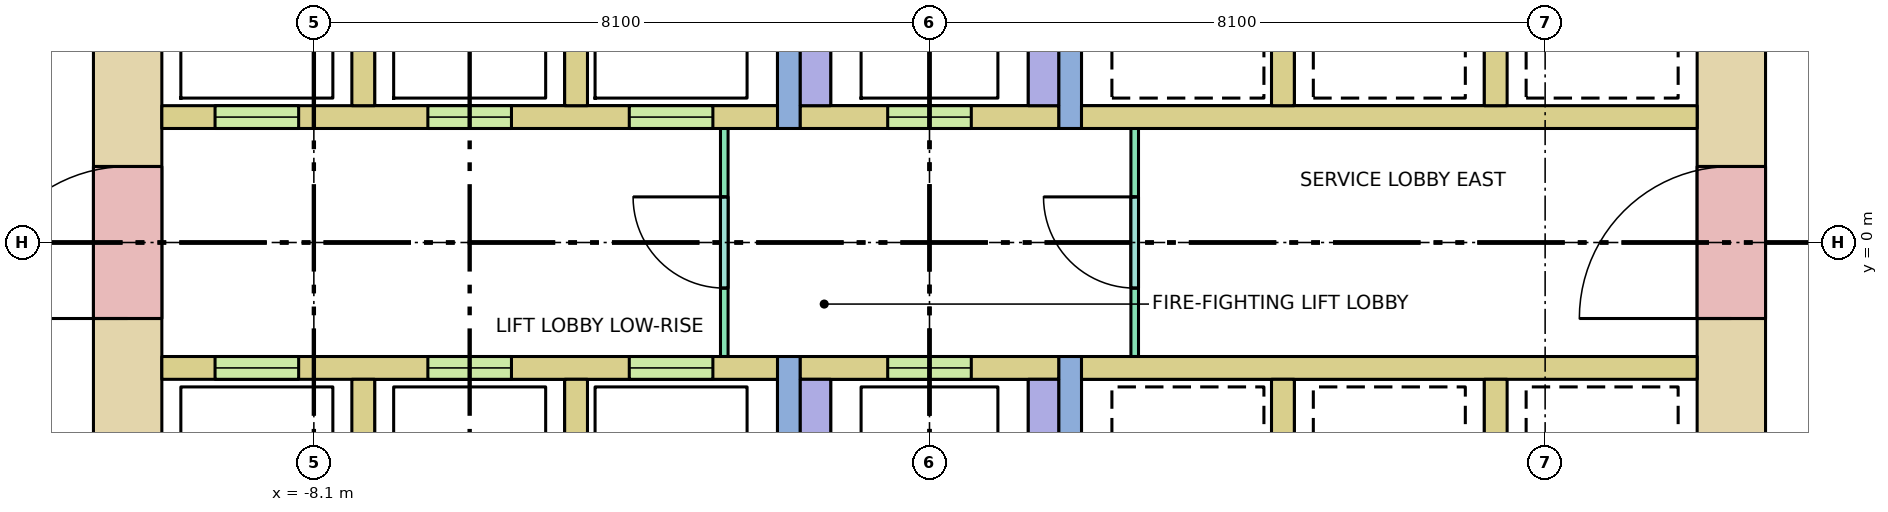
"""IFC4 building model, lengths in metres.
Left out: names, types, materials, properties, quantities, classifications, styles, units other than length and angle.
Written with IfcOpenShell. Run it as: python <this file> out.ifc"""

import sys

from ifc_helpers import new_model, si_unit, direction, frame, frame_2d, origin, place, context, subcontext, project, spatial, rectangle, extrude, element, fill, save


model = new_model("IFC4")
c1 = context("Model", 3, precision=1e-05, world=origin(), true_north=direction((0.0, 1.0)))
c2 = subcontext(c1, "Body", "Model", "MODEL_VIEW")
j1 = project(units=[si_unit("LENGTHUNIT", "METRE"), si_unit("PLANEANGLEUNIT", "RADIAN")], contexts=[c1])
p1 = place(None, origin())
s1 = spatial("IfcSite", under=j1, at=p1, CompositionType="ELEMENT")
p2 = place(p1, origin())
s2 = spatial("IfcBuilding", under=s1, at=p2, CompositionType="ELEMENT")
p3 = place(p2, frame((0.0, 0.0, 127.6)))
s3 = spatial("IfcBuildingStorey", under=s2, at=p3, CompositionType="ELEMENT", Elevation=127.6)
p4 = place(p3, frame((-10.55, -5.13, -0.28), z_axis=(0.0, 0.0, 1.0), x_axis=(0.0, 1.0, 0.0)))
e1 = element("IfcWall", 1, at=p4, inside=s3, PredefinedType="SHEAR", context=c2, shape_type="SweptSolid", body=[
    extrude(rectangle(XDim=10.26, YDim=0.9, at=frame_2d((5.13, 0.0))), origin(), (0.0, 0.0, 1.0), 3.8),
])
p5 = place(p4, frame((4.13, 0.0, 0.28)))
e2 = element("IfcOpeningElement", 2, at=p5, cuts=e1, PredefinedType="OPENING", context=c2, shape_type="SweptSolid", body=[
    extrude(rectangle(XDim=2.0, YDim=2.1, at=frame_2d((1.0, 1.05))), frame((0.0, 0.46, 0.0), z_axis=(0.0, -1.0, 0.0), x_axis=(1.0, 0.0, 0.0)), (0.0, 0.0, 1.0), 0.92),
])
p6 = place(p3, frame((10.55, -5.13, -0.28), z_axis=(0.0, 0.0, 1.0), x_axis=(0.0, 1.0, 0.0)))
e3 = element("IfcWall", 3, at=p6, inside=s3, PredefinedType="SHEAR", context=c2, shape_type="SweptSolid", body=[
    extrude(rectangle(XDim=10.26, YDim=0.9, at=frame_2d((5.13, 0.0))), origin(), (0.0, 0.0, 1.0), 3.8),
])
p7 = place(p6, frame((4.13, 0.0, 0.28)))
e4 = element("IfcOpeningElement", 4, at=p7, cuts=e3, PredefinedType="OPENING", context=c2, shape_type="SweptSolid", body=[
    extrude(rectangle(XDim=2.0, YDim=2.1, at=frame_2d((1.0, 1.05))), frame((0.0, 0.46, 0.0), z_axis=(0.0, -1.0, 0.0), x_axis=(1.0, 0.0, 0.0)), (0.0, 0.0, 1.0), 0.92),
])
p8 = place(p3, frame((-10.1, 1.65, 0.0), z_axis=(0.0, 0.0, 1.0), x_axis=(1.0, 0.0, 0.0)))
e5 = element("IfcWall", 5, at=p8, inside=s3, PredefinedType="SOLIDWALL", context=c2, shape_type="SweptSolid", body=[
    extrude(rectangle(XDim=8.1, YDim=0.3, at=frame_2d((4.05, 0.0))), origin(), (0.0, 0.0, 1.0), 3.52),
])
p9 = place(p8, frame((0.7, 0.0, 0.0)))
e6 = element("IfcOpeningElement", 6, at=p9, cuts=e5, PredefinedType="OPENING", context=c2, shape_type="SweptSolid", body=[
    extrude(rectangle(XDim=1.1, YDim=2.1, at=frame_2d((0.55, 1.05))), frame((0.0, 0.16, 0.0), z_axis=(0.0, -1.0, 0.0), x_axis=(1.0, 0.0, 0.0)), (0.0, 0.0, 1.0), 0.32),
])
p10 = place(p8, frame((3.5, 0.0, 0.0)))
e7 = element("IfcOpeningElement", 7, at=p10, cuts=e5, PredefinedType="OPENING", context=c2, shape_type="SweptSolid", body=[
    extrude(rectangle(XDim=1.1, YDim=2.1, at=frame_2d((0.55, 1.05))), frame((0.0, 0.16, 0.0), z_axis=(0.0, -1.0, 0.0), x_axis=(1.0, 0.0, 0.0)), (0.0, 0.0, 1.0), 0.32),
])
p11 = place(p8, frame((6.15, 0.0, 0.0)))
e8 = element("IfcOpeningElement", 8, at=p11, cuts=e5, PredefinedType="OPENING", context=c2, shape_type="SweptSolid", body=[
    extrude(rectangle(XDim=1.1, YDim=2.1, at=frame_2d((0.55, 1.05))), frame((0.0, 0.16, 0.0), z_axis=(0.0, -1.0, 0.0), x_axis=(1.0, 0.0, 0.0)), (0.0, 0.0, 1.0), 0.32),
])
p12 = place(p3, frame((-10.1, -1.65, 0.0), z_axis=(0.0, 0.0, 1.0), x_axis=(1.0, 0.0, 0.0)))
e9 = element("IfcWall", 9, at=p12, inside=s3, PredefinedType="SOLIDWALL", context=c2, shape_type="SweptSolid", body=[
    extrude(rectangle(XDim=8.1, YDim=0.3, at=frame_2d((4.05, 0.0))), origin(), (0.0, 0.0, 1.0), 3.52),
])
p13 = place(p12, frame((0.7, 0.0, 0.0)))
e10 = element("IfcOpeningElement", 10, at=p13, cuts=e9, PredefinedType="OPENING", context=c2, shape_type="SweptSolid", body=[
    extrude(rectangle(XDim=1.1, YDim=2.1, at=frame_2d((0.55, 1.05))), frame((0.0, 0.16, 0.0), z_axis=(0.0, -1.0, 0.0), x_axis=(1.0, 0.0, 0.0)), (0.0, 0.0, 1.0), 0.32),
])
p14 = place(p12, frame((3.5, 0.0, 0.0)))
e11 = element("IfcOpeningElement", 11, at=p14, cuts=e9, PredefinedType="OPENING", context=c2, shape_type="SweptSolid", body=[
    extrude(rectangle(XDim=1.1, YDim=2.1, at=frame_2d((0.55, 1.05))), frame((0.0, 0.16, 0.0), z_axis=(0.0, -1.0, 0.0), x_axis=(1.0, 0.0, 0.0)), (0.0, 0.0, 1.0), 0.32),
])
p15 = place(p12, frame((6.15, 0.0, 0.0)))
e12 = element("IfcOpeningElement", 12, at=p15, cuts=e9, PredefinedType="OPENING", context=c2, shape_type="SweptSolid", body=[
    extrude(rectangle(XDim=1.1, YDim=2.1, at=frame_2d((0.55, 1.05))), frame((0.0, 0.16, 0.0), z_axis=(0.0, -1.0, 0.0), x_axis=(1.0, 0.0, 0.0)), (0.0, 0.0, 1.0), 0.32),
])
for number, where, z_axis, x_axis in (
    (13, (2.0, 1.65, 0.0), (0.0, 0.0, 1.0), (1.0, 0.0, 0.0)),
    (14, (2.0, -1.65, 0.0), (0.0, 0.0, 1.0), (1.0, 0.0, 0.0)),
):
    element("IfcWall", number, at=place(p3, frame(where, z_axis=z_axis, x_axis=x_axis)), inside=s3, PredefinedType="SOLIDWALL", context=c2, shape_type="SweptSolid", body=[
        extrude(rectangle(XDim=8.1, YDim=0.3, at=frame_2d((4.05, 0.0))), origin(), (0.0, 0.0, 1.0), 3.52),
    ])
for number, where, z_axis, x_axis in (
    (15, (-7.45, 1.8, 0.0), (0.0, 0.0, 1.0), (0.0, 1.0, 0.0)),
    (16, (-7.45, -4.2, 0.0), (0.0, 0.0, 1.0), (0.0, 1.0, 0.0)),
    (17, (-4.65, 1.8, 0.0), (0.0, 0.0, 1.0), (0.0, 1.0, 0.0)),
    (18, (-4.65, -4.2, 0.0), (0.0, 0.0, 1.0), (0.0, 1.0, 0.0)),
    (19, (4.65, 1.8, 0.0), (0.0, 0.0, 1.0), (0.0, 1.0, 0.0)),
    (20, (4.65, -4.2, 0.0), (0.0, 0.0, 1.0), (0.0, 1.0, 0.0)),
    (21, (7.45, 1.8, 0.0), (0.0, 0.0, 1.0), (0.0, 1.0, 0.0)),
    (22, (7.45, -4.2, 0.0), (0.0, 0.0, 1.0), (0.0, 1.0, 0.0)),
):
    element("IfcWall", number, at=place(p3, frame(where, z_axis=z_axis, x_axis=x_axis)), inside=s3, PredefinedType="SOLIDWALL", context=c2, shape_type="SweptSolid", body=[
        extrude(rectangle(XDim=2.4, YDim=0.3, at=frame_2d((1.2, 0.0))), origin(), (0.0, 0.0, 1.0), 3.52),
    ])
for number, where, z_axis, x_axis in (
    (23, (-1.85, 1.5, 0.0), (0.0, 0.0, 1.0), (0.0, 1.0, 0.0)),
    (24, (-1.85, -8.1, 0.0), (0.0, 0.0, 1.0), (0.0, 1.0, 0.0)),
    (25, (1.85, 1.5, 0.0), (0.0, 0.0, 1.0), (0.0, 1.0, 0.0)),
    (26, (1.85, -8.1, 0.0), (0.0, 0.0, 1.0), (0.0, 1.0, 0.0)),
):
    element("IfcWall", number, at=place(p3, frame(where, z_axis=z_axis, x_axis=x_axis)), inside=s3, PredefinedType="SHEAR", context=c2, shape_type="SweptSolid", body=[
        extrude(rectangle(XDim=6.6, YDim=0.3, at=frame_2d((3.3, 0.0))), origin(), (0.0, 0.0, 1.0), 3.52),
    ])
p16 = place(p3, frame((-1.7, 1.65, 0.0), z_axis=(0.0, 0.0, 1.0), x_axis=(1.0, 0.0, 0.0)))
e27 = element("IfcWall", 27, at=p16, inside=s3, PredefinedType="SOLIDWALL", context=c2, shape_type="SweptSolid", body=[
    extrude(rectangle(XDim=3.4, YDim=0.3, at=frame_2d((1.7, 0.0))), origin(), (0.0, 0.0, 1.0), 3.52),
])
p17 = place(p16, frame((1.15, 0.0, 0.0)))
e28 = element("IfcOpeningElement", 28, at=p17, cuts=e27, PredefinedType="OPENING", context=c2, shape_type="SweptSolid", body=[
    extrude(rectangle(XDim=1.1, YDim=2.1, at=frame_2d((0.55, 1.05))), frame((0.0, 0.16, 0.0), z_axis=(0.0, -1.0, 0.0), x_axis=(1.0, 0.0, 0.0)), (0.0, 0.0, 1.0), 0.32),
])
p18 = place(p3, frame((-1.7, -1.65, 0.0), z_axis=(0.0, 0.0, 1.0), x_axis=(1.0, 0.0, 0.0)))
e29 = element("IfcWall", 29, at=p18, inside=s3, PredefinedType="SOLIDWALL", context=c2, shape_type="SweptSolid", body=[
    extrude(rectangle(XDim=3.4, YDim=0.3, at=frame_2d((1.7, 0.0))), origin(), (0.0, 0.0, 1.0), 3.52),
])
p19 = place(p18, frame((1.15, 0.0, 0.0)))
e30 = element("IfcOpeningElement", 30, at=p19, cuts=e29, PredefinedType="OPENING", context=c2, shape_type="SweptSolid", body=[
    extrude(rectangle(XDim=1.1, YDim=2.1, at=frame_2d((0.55, 1.05))), frame((0.0, 0.16, 0.0), z_axis=(0.0, -1.0, 0.0), x_axis=(1.0, 0.0, 0.0)), (0.0, 0.0, 1.0), 0.32),
])
for number, where, z_axis, x_axis in (
    (31, (-1.5, 1.8, 0.0), (0.0, 0.0, 1.0), (0.0, 1.0, 0.0)),
    (32, (-1.5, -4.8, 0.0), (0.0, 0.0, 1.0), (0.0, 1.0, 0.0)),
    (33, (1.5, 1.8, 0.0), (0.0, 0.0, 1.0), (0.0, 1.0, 0.0)),
    (34, (1.5, -4.8, 0.0), (0.0, 0.0, 1.0), (0.0, 1.0, 0.0)),
):
    element("IfcWall", number, at=place(p3, frame(where, z_axis=z_axis, x_axis=x_axis)), inside=s3, PredefinedType="SOLIDWALL", context=c2, shape_type="SweptSolid", body=[
        extrude(rectangle(XDim=3.0, YDim=0.4, at=frame_2d((1.5, 0.0))), origin(), (0.0, 0.0, 1.0), 3.52),
    ])
p20 = place(p3, frame((-2.7, -1.5, 0.0), z_axis=(0.0, 0.0, 1.0), x_axis=(0.0, 1.0, 0.0)))
e35 = element("IfcWall", 35, at=p20, inside=s3, PredefinedType="PARTITIONING", context=c2, shape_type="SweptSolid", body=[
    extrude(rectangle(XDim=3.0, YDim=0.1, at=frame_2d((1.5, 0.0))), origin(), (0.0, 0.0, 1.0), 3.52),
])
p21 = place(p20, frame((0.9, 0.0, 0.0)))
e36 = element("IfcOpeningElement", 36, at=p21, cuts=e35, PredefinedType="OPENING", context=c2, shape_type="SweptSolid", body=[
    extrude(rectangle(XDim=1.2, YDim=2.1, at=frame_2d((0.6, 1.05))), frame((0.0, 0.06, 0.0), z_axis=(0.0, -1.0, 0.0), x_axis=(1.0, 0.0, 0.0)), (0.0, 0.0, 1.0), 0.12),
])
p22 = place(p3, frame((2.7, -1.5, 0.0), z_axis=(0.0, 0.0, 1.0), x_axis=(0.0, 1.0, 0.0)))
e37 = element("IfcWall", 37, at=p22, inside=s3, PredefinedType="PARTITIONING", context=c2, shape_type="SweptSolid", body=[
    extrude(rectangle(XDim=3.0, YDim=0.1, at=frame_2d((1.5, 0.0))), origin(), (0.0, 0.0, 1.0), 3.52),
])
p23 = place(p22, frame((0.9, 0.0, 0.0)))
e38 = element("IfcOpeningElement", 38, at=p23, cuts=e37, PredefinedType="OPENING", context=c2, shape_type="SweptSolid", body=[
    extrude(rectangle(XDim=1.2, YDim=2.1, at=frame_2d((0.6, 1.05))), frame((0.0, 0.06, 0.0), z_axis=(0.0, -1.0, 0.0), x_axis=(1.0, 0.0, 0.0)), (0.0, 0.0, 1.0), 0.12),
])
p24 = place(p9, origin())
e39 = element("IfcDoor", 39, at=p24, inside=s3, OperationType="DOUBLE_DOOR_SLIDING", PredefinedType="DOOR", context=c2, shape_type="SweptSolid", body=[
    extrude(rectangle(XDim=1.1, YDim=2.1, at=frame_2d((0.55, 1.05))), frame((0.0, 0.025, 0.0), z_axis=(0.0, -1.0, 0.0), x_axis=(1.0, 0.0, 0.0)), (0.0, 0.0, 1.0), 0.05),
])
fill(e6, e39)
p25 = place(p10, origin())
e40 = element("IfcDoor", 40, at=p25, inside=s3, OperationType="DOUBLE_DOOR_SLIDING", PredefinedType="DOOR", context=c2, shape_type="SweptSolid", body=[
    extrude(rectangle(XDim=1.1, YDim=2.1, at=frame_2d((0.55, 1.05))), frame((0.0, 0.025, 0.0), z_axis=(0.0, -1.0, 0.0), x_axis=(1.0, 0.0, 0.0)), (0.0, 0.0, 1.0), 0.05),
])
fill(e7, e40)
p26 = place(p11, origin())
e41 = element("IfcDoor", 41, at=p26, inside=s3, OperationType="DOUBLE_DOOR_SLIDING", PredefinedType="DOOR", context=c2, shape_type="SweptSolid", body=[
    extrude(rectangle(XDim=1.1, YDim=2.1, at=frame_2d((0.55, 1.05))), frame((0.0, 0.025, 0.0), z_axis=(0.0, -1.0, 0.0), x_axis=(1.0, 0.0, 0.0)), (0.0, 0.0, 1.0), 0.05),
])
fill(e8, e41)
p27 = place(p13, origin())
e42 = element("IfcDoor", 42, at=p27, inside=s3, OperationType="DOUBLE_DOOR_SLIDING", PredefinedType="DOOR", context=c2, shape_type="SweptSolid", body=[
    extrude(rectangle(XDim=1.1, YDim=2.1, at=frame_2d((0.55, 1.05))), frame((0.0, 0.025, 0.0), z_axis=(0.0, -1.0, 0.0), x_axis=(1.0, 0.0, 0.0)), (0.0, 0.0, 1.0), 0.05),
])
fill(e10, e42)
p28 = place(p14, origin())
e43 = element("IfcDoor", 43, at=p28, inside=s3, OperationType="DOUBLE_DOOR_SLIDING", PredefinedType="DOOR", context=c2, shape_type="SweptSolid", body=[
    extrude(rectangle(XDim=1.1, YDim=2.1, at=frame_2d((0.55, 1.05))), frame((0.0, 0.025, 0.0), z_axis=(0.0, -1.0, 0.0), x_axis=(1.0, 0.0, 0.0)), (0.0, 0.0, 1.0), 0.05),
])
fill(e11, e43)
p29 = place(p15, origin())
e44 = element("IfcDoor", 44, at=p29, inside=s3, OperationType="DOUBLE_DOOR_SLIDING", PredefinedType="DOOR", context=c2, shape_type="SweptSolid", body=[
    extrude(rectangle(XDim=1.1, YDim=2.1, at=frame_2d((0.55, 1.05))), frame((0.0, 0.025, 0.0), z_axis=(0.0, -1.0, 0.0), x_axis=(1.0, 0.0, 0.0)), (0.0, 0.0, 1.0), 0.05),
])
fill(e12, e44)
p30 = place(p17, origin())
e45 = element("IfcDoor", 45, at=p30, inside=s3, OperationType="DOUBLE_DOOR_SLIDING", PredefinedType="DOOR", context=c2, shape_type="SweptSolid", body=[
    extrude(rectangle(XDim=1.1, YDim=2.1, at=frame_2d((0.55, 1.05))), frame((0.0, 0.025, 0.0), z_axis=(0.0, -1.0, 0.0), x_axis=(1.0, 0.0, 0.0)), (0.0, 0.0, 1.0), 0.05),
])
fill(e28, e45)
p31 = place(p19, origin())
e46 = element("IfcDoor", 46, at=p31, inside=s3, OperationType="DOUBLE_DOOR_SLIDING", PredefinedType="DOOR", context=c2, shape_type="SweptSolid", body=[
    extrude(rectangle(XDim=1.1, YDim=2.1, at=frame_2d((0.55, 1.05))), frame((0.0, 0.025, 0.0), z_axis=(0.0, -1.0, 0.0), x_axis=(1.0, 0.0, 0.0)), (0.0, 0.0, 1.0), 0.05),
])
fill(e30, e46)
p32 = place(p5, origin())
e47 = element("IfcDoor", 47, at=p32, inside=s3, OperationType="DOUBLE_DOOR_SINGLE_SWING", PredefinedType="DOOR", context=c2, shape_type="SweptSolid", body=[
    extrude(rectangle(XDim=2.0, YDim=2.1, at=frame_2d((1.0, 1.05))), frame((0.0, 0.025, 0.0), z_axis=(0.0, -1.0, 0.0), x_axis=(1.0, 0.0, 0.0)), (0.0, 0.0, 1.0), 0.05),
])
fill(e2, e47)
p33 = place(p7, origin())
e48 = element("IfcDoor", 48, at=p33, inside=s3, OperationType="DOUBLE_DOOR_SINGLE_SWING", PredefinedType="DOOR", context=c2, shape_type="SweptSolid", body=[
    extrude(rectangle(XDim=2.0, YDim=2.1, at=frame_2d((1.0, 1.05))), frame((0.0, 0.025, 0.0), z_axis=(0.0, -1.0, 0.0), x_axis=(1.0, 0.0, 0.0)), (0.0, 0.0, 1.0), 0.05),
])
fill(e4, e48)
p34 = place(p21, origin())
e49 = element("IfcDoor", 49, at=p34, inside=s3, OperationType="SINGLE_SWING_RIGHT", PredefinedType="DOOR", context=c2, shape_type="SweptSolid", body=[
    extrude(rectangle(XDim=1.2, YDim=2.1, at=frame_2d((0.6, 1.05))), frame((0.0, 0.025, 0.0), z_axis=(0.0, -1.0, 0.0), x_axis=(1.0, 0.0, 0.0)), (0.0, 0.0, 1.0), 0.05),
])
fill(e36, e49)
p35 = place(p23, origin())
e50 = element("IfcDoor", 50, at=p35, inside=s3, OperationType="SINGLE_SWING_RIGHT", PredefinedType="DOOR", context=c2, shape_type="SweptSolid", body=[
    extrude(rectangle(XDim=1.2, YDim=2.1, at=frame_2d((0.6, 1.05))), frame((0.0, 0.025, 0.0), z_axis=(0.0, -1.0, 0.0), x_axis=(1.0, 0.0, 0.0)), (0.0, 0.0, 1.0), 0.05),
])
fill(e38, e50)
save(model, sys.argv[1])
